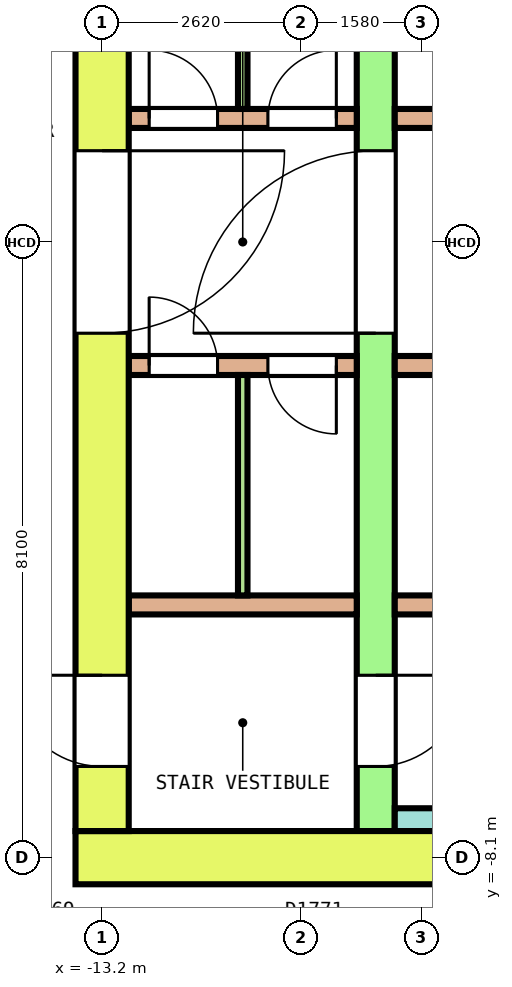
"""IFC4 building model, lengths in metres.
Left out: names, types, materials, properties, quantities, classifications, styles, units other than length and angle.
Written with IfcOpenShell. Run it as: python <this file> out.ifc"""

import sys

from ifc_helpers import new_model, si_unit, direction, frame, frame_2d, origin, place, context, subcontext, project, spatial, rectangle, extrude, element, fill, save


model = new_model("IFC4")
c1 = context("Model", 3, precision=1e-05, world=origin(), true_north=direction((0.0, 1.0)))
c2 = subcontext(c1, "Body", "Model", "MODEL_VIEW")
j1 = project(units=[si_unit("LENGTHUNIT", "METRE"), si_unit("PLANEANGLEUNIT", "RADIAN")], contexts=[c1])
p1 = place(None, origin())
s1 = spatial("IfcSite", under=j1, at=p1, CompositionType="ELEMENT")
p2 = place(p1, origin())
s2 = spatial("IfcBuilding", under=s1, at=p2, CompositionType="ELEMENT")
p3 = place(p2, frame((0.0, 0.0, 162.8)))
s3 = spatial("IfcBuildingStorey", under=s2, at=p3, CompositionType="ELEMENT", Elevation=162.8)
p4 = place(p3, frame((-13.55, -8.1, 0.0), z_axis=(0.0, 0.0, 1.0), x_axis=(1.0, 0.0, 0.0)))
e1 = element("IfcWall", 1, at=p4, inside=s3, PredefinedType="SHEAR", context=c2, shape_type="SweptSolid", body=[
    extrude(rectangle(XDim=27.1, YDim=0.7, at=frame_2d((13.55, 0.0))), origin(), (0.0, 0.0, 1.0), 4.1),
])
p5 = place(p4, frame((15.1, 0.0, 0.0)))
e2 = element("IfcOpeningElement", 2, at=p5, cuts=e1, PredefinedType="OPENING", context=c2, shape_type="SweptSolid", body=[
    extrude(rectangle(XDim=1.2, YDim=2.1, at=frame_2d((0.6, 1.05))), frame((0.0, 0.36, 0.0), z_axis=(0.0, -1.0, 0.0), x_axis=(1.0, 0.0, 0.0)), (0.0, 0.0, 1.0), 0.72),
])
p6 = place(p3, frame((-13.2, -7.75, 0.0), z_axis=(0.0, 0.0, 1.0), x_axis=(0.0, 1.0, 0.0)))
e3 = element("IfcWall", 3, at=p6, inside=s3, PredefinedType="SHEAR", context=c2, shape_type="SweptSolid", body=[
    extrude(rectangle(XDim=15.5, YDim=0.7, at=frame_2d((7.75, 0.0))), origin(), (0.0, 0.0, 1.0), 4.1),
])
p7 = place(p6, frame((6.55, 0.0, 0.0)))
e4 = element("IfcOpeningElement", 4, at=p7, cuts=e3, PredefinedType="OPENING", context=c2, shape_type="SweptSolid", body=[
    extrude(rectangle(XDim=2.4, YDim=2.1, at=frame_2d((1.2, 1.05))), frame((0.0, 0.36, 0.0), z_axis=(0.0, -1.0, 0.0), x_axis=(1.0, 0.0, 0.0)), (0.0, 0.0, 1.0), 0.72),
])
p8 = place(p6, frame((13.45, 0.0, 0.0)))
e5 = element("IfcOpeningElement", 5, at=p8, cuts=e3, PredefinedType="OPENING", context=c2, shape_type="SweptSolid", body=[
    extrude(rectangle(XDim=1.2, YDim=2.1, at=frame_2d((0.6, 1.05))), frame((0.0, 0.36, 0.0), z_axis=(0.0, -1.0, 0.0), x_axis=(1.0, 0.0, 0.0)), (0.0, 0.0, 1.0), 0.72),
])
p9 = place(p6, frame((0.85, 0.0, 0.0)))
e6 = element("IfcOpeningElement", 6, at=p9, cuts=e3, PredefinedType="OPENING", context=c2, shape_type="SweptSolid", body=[
    extrude(rectangle(XDim=1.2, YDim=2.1, at=frame_2d((0.6, 1.05))), frame((0.0, 0.36, 0.0), z_axis=(0.0, -1.0, 0.0), x_axis=(1.0, 0.0, 0.0)), (0.0, 0.0, 1.0), 0.72),
])
p10 = place(p3, frame((-9.6, -7.75, 0.0), z_axis=(0.0, 0.0, 1.0), x_axis=(0.0, 1.0, 0.0)))
e7 = element("IfcWall", 7, at=p10, inside=s3, PredefinedType="SHEAR", context=c2, shape_type="SweptSolid", body=[
    extrude(rectangle(XDim=15.5, YDim=0.5, at=frame_2d((7.75, 0.0))), origin(), (0.0, 0.0, 1.0), 4.1),
])
p11 = place(p10, frame((6.55, 0.0, 0.0)))
e8 = element("IfcOpeningElement", 8, at=p11, cuts=e7, PredefinedType="OPENING", context=c2, shape_type="SweptSolid", body=[
    extrude(rectangle(XDim=2.4, YDim=2.1, at=frame_2d((1.2, 1.05))), frame((0.0, 0.26, 0.0), z_axis=(0.0, -1.0, 0.0), x_axis=(1.0, 0.0, 0.0)), (0.0, 0.0, 1.0), 0.52),
])
p12 = place(p10, frame((13.45, 0.0, 0.0)))
e9 = element("IfcOpeningElement", 9, at=p12, cuts=e7, PredefinedType="OPENING", context=c2, shape_type="SweptSolid", body=[
    extrude(rectangle(XDim=1.2, YDim=2.1, at=frame_2d((0.6, 1.05))), frame((0.0, 0.26, 0.0), z_axis=(0.0, -1.0, 0.0), x_axis=(1.0, 0.0, 0.0)), (0.0, 0.0, 1.0), 0.52),
])
p13 = place(p10, frame((0.85, 0.0, 0.0)))
e10 = element("IfcOpeningElement", 10, at=p13, cuts=e7, PredefinedType="OPENING", context=c2, shape_type="SweptSolid", body=[
    extrude(rectangle(XDim=1.2, YDim=2.1, at=frame_2d((0.6, 1.05))), frame((0.0, 0.26, 0.0), z_axis=(0.0, -1.0, 0.0), x_axis=(1.0, 0.0, 0.0)), (0.0, 0.0, 1.0), 0.52),
])
p14 = place(p3, frame((-12.85, 1.625, 0.0), z_axis=(0.0, 0.0, 1.0), x_axis=(1.0, 0.0, 0.0)))
e11 = element("IfcWall", 11, at=p14, inside=s3, PredefinedType="SOLIDWALL", context=c2, shape_type="SweptSolid", body=[
    extrude(rectangle(XDim=3.0, YDim=0.25, at=frame_2d((1.5, 0.0))), origin(), (0.0, 0.0, 1.0), 4.1),
])
p15 = place(p14, frame((0.269, 0.0, 0.0)))
e12 = element("IfcOpeningElement", 12, at=p15, cuts=e11, PredefinedType="OPENING", context=c2, shape_type="SweptSolid", body=[
    extrude(rectangle(XDim=0.9, YDim=2.1, at=frame_2d((0.45, 1.05))), frame((0.0, 0.135, 0.0), z_axis=(0.0, -1.0, 0.0), x_axis=(1.0, 0.0, 0.0)), (0.0, 0.0, 1.0), 0.27),
])
p16 = place(p14, frame((1.831, 0.0, 0.0)))
e13 = element("IfcOpeningElement", 13, at=p16, cuts=e11, PredefinedType="OPENING", context=c2, shape_type="SweptSolid", body=[
    extrude(rectangle(XDim=0.9, YDim=2.1, at=frame_2d((0.45, 1.05))), frame((0.0, 0.135, 0.0), z_axis=(0.0, -1.0, 0.0), x_axis=(1.0, 0.0, 0.0)), (0.0, 0.0, 1.0), 0.27),
])
p17 = place(p3, frame((-9.35, 1.625, 0.0), z_axis=(0.0, 0.0, 1.0), x_axis=(1.0, 0.0, 0.0)))
e14 = element("IfcWall", 14, at=p17, inside=s3, PredefinedType="SOLIDWALL", context=c2, shape_type="SweptSolid", body=[
    extrude(rectangle(XDim=18.7, YDim=0.25, at=frame_2d((9.35, 0.0))), origin(), (0.0, 0.0, 1.0), 4.1),
])
p18 = place(p17, frame((2.85, 0.0, 0.0)))
e15 = element("IfcOpeningElement", 15, at=p18, cuts=e14, PredefinedType="OPENING", context=c2, shape_type="SweptSolid", body=[
    extrude(rectangle(XDim=1.1, YDim=2.1, at=frame_2d((0.55, 1.05))), frame((0.0, 0.135, 0.0), z_axis=(0.0, -1.0, 0.0), x_axis=(1.0, 0.0, 0.0)), (0.0, 0.0, 1.0), 0.27),
])
p19 = place(p17, frame((5.15, 0.0, 0.0)))
e16 = element("IfcOpeningElement", 16, at=p19, cuts=e14, PredefinedType="OPENING", context=c2, shape_type="SweptSolid", body=[
    extrude(rectangle(XDim=1.1, YDim=2.1, at=frame_2d((0.55, 1.05))), frame((0.0, 0.135, 0.0), z_axis=(0.0, -1.0, 0.0), x_axis=(1.0, 0.0, 0.0)), (0.0, 0.0, 1.0), 0.27),
])
p20 = place(p17, frame((14.8, 0.0, 0.0)))
e17 = element("IfcOpeningElement", 17, at=p20, cuts=e14, PredefinedType="OPENING", context=c2, shape_type="SweptSolid", body=[
    extrude(rectangle(XDim=1.1, YDim=2.1, at=frame_2d((0.55, 1.05))), frame((0.0, 0.135, 0.0), z_axis=(0.0, -1.0, 0.0), x_axis=(1.0, 0.0, 0.0)), (0.0, 0.0, 1.0), 0.27),
])
p21 = place(p17, frame((0.575, 0.0, 0.0)))
e18 = element("IfcOpeningElement", 18, at=p21, cuts=e14, PredefinedType="OPENING", context=c2, shape_type="SweptSolid", body=[
    extrude(rectangle(XDim=0.9, YDim=2.1, at=frame_2d((0.45, 1.05))), frame((0.0, 0.135, 0.0), z_axis=(0.0, -1.0, 0.0), x_axis=(1.0, 0.0, 0.0)), (0.0, 0.0, 1.0), 0.27),
])
p22 = place(p17, frame((17.225, 0.0, 0.0)))
e19 = element("IfcOpeningElement", 19, at=p22, cuts=e14, PredefinedType="OPENING", context=c2, shape_type="SweptSolid", body=[
    extrude(rectangle(XDim=0.9, YDim=2.1, at=frame_2d((0.45, 1.05))), frame((0.0, 0.135, 0.0), z_axis=(0.0, -1.0, 0.0), x_axis=(1.0, 0.0, 0.0)), (0.0, 0.0, 1.0), 0.27),
])
p23 = place(p3, frame((-12.85, -1.625, 0.0), z_axis=(0.0, 0.0, 1.0), x_axis=(1.0, 0.0, 0.0)))
e20 = element("IfcWall", 20, at=p23, inside=s3, PredefinedType="SOLIDWALL", context=c2, shape_type="SweptSolid", body=[
    extrude(rectangle(XDim=3.0, YDim=0.25, at=frame_2d((1.5, 0.0))), origin(), (0.0, 0.0, 1.0), 4.1),
])
p24 = place(p23, frame((0.269, 0.0, 0.0)))
e21 = element("IfcOpeningElement", 21, at=p24, cuts=e20, PredefinedType="OPENING", context=c2, shape_type="SweptSolid", body=[
    extrude(rectangle(XDim=0.9, YDim=2.1, at=frame_2d((0.45, 1.05))), frame((0.0, 0.135, 0.0), z_axis=(0.0, -1.0, 0.0), x_axis=(1.0, 0.0, 0.0)), (0.0, 0.0, 1.0), 0.27),
])
p25 = place(p23, frame((1.831, 0.0, 0.0)))
e22 = element("IfcOpeningElement", 22, at=p25, cuts=e20, PredefinedType="OPENING", context=c2, shape_type="SweptSolid", body=[
    extrude(rectangle(XDim=0.9, YDim=2.1, at=frame_2d((0.45, 1.05))), frame((0.0, 0.135, 0.0), z_axis=(0.0, -1.0, 0.0), x_axis=(1.0, 0.0, 0.0)), (0.0, 0.0, 1.0), 0.27),
])
p26 = place(p3, frame((-9.35, -1.625, 0.0), z_axis=(0.0, 0.0, 1.0), x_axis=(1.0, 0.0, 0.0)))
e23 = element("IfcWall", 23, at=p26, inside=s3, PredefinedType="SOLIDWALL", context=c2, shape_type="SweptSolid", body=[
    extrude(rectangle(XDim=18.7, YDim=0.25, at=frame_2d((9.35, 0.0))), origin(), (0.0, 0.0, 1.0), 4.1),
])
p27 = place(p26, frame((2.85, 0.0, 0.0)))
e24 = element("IfcOpeningElement", 24, at=p27, cuts=e23, PredefinedType="OPENING", context=c2, shape_type="SweptSolid", body=[
    extrude(rectangle(XDim=1.1, YDim=2.1, at=frame_2d((0.55, 1.05))), frame((0.0, 0.135, 0.0), z_axis=(0.0, -1.0, 0.0), x_axis=(1.0, 0.0, 0.0)), (0.0, 0.0, 1.0), 0.27),
])
p28 = place(p26, frame((5.15, 0.0, 0.0)))
e25 = element("IfcOpeningElement", 25, at=p28, cuts=e23, PredefinedType="OPENING", context=c2, shape_type="SweptSolid", body=[
    extrude(rectangle(XDim=1.1, YDim=2.1, at=frame_2d((0.55, 1.05))), frame((0.0, 0.135, 0.0), z_axis=(0.0, -1.0, 0.0), x_axis=(1.0, 0.0, 0.0)), (0.0, 0.0, 1.0), 0.27),
])
p29 = place(p26, frame((14.8, 0.0, 0.0)))
e26 = element("IfcOpeningElement", 26, at=p29, cuts=e23, PredefinedType="OPENING", context=c2, shape_type="SweptSolid", body=[
    extrude(rectangle(XDim=1.1, YDim=2.1, at=frame_2d((0.55, 1.05))), frame((0.0, 0.135, 0.0), z_axis=(0.0, -1.0, 0.0), x_axis=(1.0, 0.0, 0.0)), (0.0, 0.0, 1.0), 0.27),
])
p30 = place(p26, frame((0.575, 0.0, 0.0)))
e27 = element("IfcOpeningElement", 27, at=p30, cuts=e23, PredefinedType="OPENING", context=c2, shape_type="SweptSolid", body=[
    extrude(rectangle(XDim=0.9, YDim=2.1, at=frame_2d((0.45, 1.05))), frame((0.0, 0.135, 0.0), z_axis=(0.0, -1.0, 0.0), x_axis=(1.0, 0.0, 0.0)), (0.0, 0.0, 1.0), 0.27),
])
p31 = place(p26, frame((17.225, 0.0, 0.0)))
e28 = element("IfcOpeningElement", 28, at=p31, cuts=e23, PredefinedType="OPENING", context=c2, shape_type="SweptSolid", body=[
    extrude(rectangle(XDim=0.9, YDim=2.1, at=frame_2d((0.45, 1.05))), frame((0.0, 0.135, 0.0), z_axis=(0.0, -1.0, 0.0), x_axis=(1.0, 0.0, 0.0)), (0.0, 0.0, 1.0), 0.27),
])
p32 = place(p3, frame((-12.85, -4.775, 0.0), z_axis=(0.0, 0.0, 1.0), x_axis=(1.0, 0.0, 0.0)))
e29 = element("IfcWall", 29, at=p32, inside=s3, PredefinedType="SOLIDWALL", context=c2, shape_type="SweptSolid", body=[
    extrude(rectangle(XDim=3.0, YDim=0.25, at=frame_2d((1.5, 0.0))), origin(), (0.0, 0.0, 1.0), 4.1),
])
p33 = place(p3, frame((-9.35, -4.775, 0.0), z_axis=(0.0, 0.0, 1.0), x_axis=(1.0, 0.0, 0.0)))
e30 = element("IfcWall", 30, at=p33, inside=s3, PredefinedType="SOLIDWALL", context=c2, shape_type="SweptSolid", body=[
    extrude(rectangle(XDim=18.7, YDim=0.25, at=frame_2d((9.35, 0.0))), origin(), (0.0, 0.0, 1.0), 4.1),
])
p34 = place(p3, frame((-9.35, -7.6, 0.0), z_axis=(0.0, 0.0, 1.0), x_axis=(1.0, 0.0, 0.0)))
e31 = element("IfcWall", 31, at=p34, inside=s3, PredefinedType="SOLIDWALL", context=c2, shape_type="SweptSolid", body=[
    extrude(rectangle(XDim=5.8, YDim=0.3, at=frame_2d((2.9, 0.0))), origin(), (0.0, 0.0, 1.0), 4.1),
])
for number, where, z_axis, x_axis in (
    (32, (-11.35, 1.75, 0.0), (0.0, 0.0, 1.0), (0.0, 1.0, 0.0)),
    (33, (-11.35, -4.65, 0.0), (0.0, 0.0, 1.0), (0.0, 1.0, 0.0)),
):
    element("IfcWall", number, at=place(p3, frame(where, z_axis=z_axis, x_axis=x_axis)), inside=s3, PredefinedType="PARTITIONING", context=c2, shape_type="SweptSolid", body=[
        extrude(rectangle(XDim=2.9, YDim=0.125, at=frame_2d((1.45, 0.0))), origin(), (0.0, 0.0, 1.0), 4.1),
    ])
p35 = place(p11, origin())
e34 = element("IfcDoor", 34, at=p35, inside=s3, OperationType="DOUBLE_DOOR_SINGLE_SWING", PredefinedType="DOOR", context=c2, shape_type="SweptSolid", body=[
    extrude(rectangle(XDim=2.4, YDim=2.1, at=frame_2d((1.2, 1.05))), frame((0.0, 0.2, 0.0), z_axis=(0.0, -1.0, 0.0), x_axis=(1.0, 0.0, 0.0)), (0.0, 0.0, 1.0), 0.4),
])
fill(e8, e34)
p36 = place(p7, origin())
e35 = element("IfcDoor", 35, at=p36, inside=s3, OperationType="DOUBLE_DOOR_SINGLE_SWING", PredefinedType="DOOR", context=c2, shape_type="SweptSolid", body=[
    extrude(rectangle(XDim=2.4, YDim=2.1, at=frame_2d((1.2, 1.05))), frame((0.0, 0.3, 0.0), z_axis=(0.0, -1.0, 0.0), x_axis=(1.0, 0.0, 0.0)), (0.0, 0.0, 1.0), 0.6),
])
fill(e4, e35)
p37 = place(p13, origin())
e36 = element("IfcDoor", 36, at=p37, inside=s3, OperationType="SINGLE_SWING_LEFT", PredefinedType="DOOR", context=c2, shape_type="SweptSolid", body=[
    extrude(rectangle(XDim=1.2, YDim=2.1, at=frame_2d((0.6, 1.05))), frame((0.0, 0.2, 0.0), z_axis=(0.0, -1.0, 0.0), x_axis=(1.0, 0.0, 0.0)), (0.0, 0.0, 1.0), 0.4),
])
fill(e10, e36)
p38 = place(p9, origin())
e37 = element("IfcDoor", 37, at=p38, inside=s3, OperationType="SINGLE_SWING_RIGHT", PredefinedType="DOOR", context=c2, shape_type="SweptSolid", body=[
    extrude(rectangle(XDim=1.2, YDim=2.1, at=frame_2d((0.6, 1.05))), frame((0.0, 0.3, 0.0), z_axis=(0.0, -1.0, 0.0), x_axis=(1.0, 0.0, 0.0)), (0.0, 0.0, 1.0), 0.6),
])
fill(e6, e37)
p39 = place(p15, origin())
e38 = element("IfcDoor", 38, at=p39, inside=s3, OperationType="SINGLE_SWING_LEFT", PredefinedType="DOOR", context=c2, shape_type="SweptSolid", body=[
    extrude(rectangle(XDim=0.9, YDim=2.1, at=frame_2d((0.45, 1.05))), frame((0.0, 0.075, 0.0), z_axis=(0.0, -1.0, 0.0), x_axis=(1.0, 0.0, 0.0)), (0.0, 0.0, 1.0), 0.15),
])
fill(e12, e38)
p40 = place(p16, origin())
e39 = element("IfcDoor", 39, at=p40, inside=s3, OperationType="SINGLE_SWING_RIGHT", PredefinedType="DOOR", context=c2, shape_type="SweptSolid", body=[
    extrude(rectangle(XDim=0.9, YDim=2.1, at=frame_2d((0.45, 1.05))), frame((0.0, 0.075, 0.0), z_axis=(0.0, -1.0, 0.0), x_axis=(1.0, 0.0, 0.0)), (0.0, 0.0, 1.0), 0.15),
])
fill(e13, e39)
p41 = place(p24, origin())
e40 = element("IfcDoor", 40, at=p41, inside=s3, OperationType="SINGLE_SWING_LEFT", PredefinedType="DOOR", context=c2, shape_type="SweptSolid", body=[
    extrude(rectangle(XDim=0.9, YDim=2.1, at=frame_2d((0.45, 1.05))), frame((0.0, 0.075, 0.0), z_axis=(0.0, -1.0, 0.0), x_axis=(1.0, 0.0, 0.0)), (0.0, 0.0, 1.0), 0.15),
])
fill(e21, e40)
p42 = place(p25, origin())
e41 = element("IfcDoor", 41, at=p42, inside=s3, OperationType="SINGLE_SWING_RIGHT", PredefinedType="DOOR", context=c2, shape_type="SweptSolid", body=[
    extrude(rectangle(XDim=0.9, YDim=2.1, at=frame_2d((0.45, 1.05))), frame((0.0, 0.075, 0.0), z_axis=(0.0, -1.0, 0.0), x_axis=(1.0, 0.0, 0.0)), (0.0, 0.0, 1.0), 0.15),
])
fill(e22, e41)
save(model, sys.argv[1])
